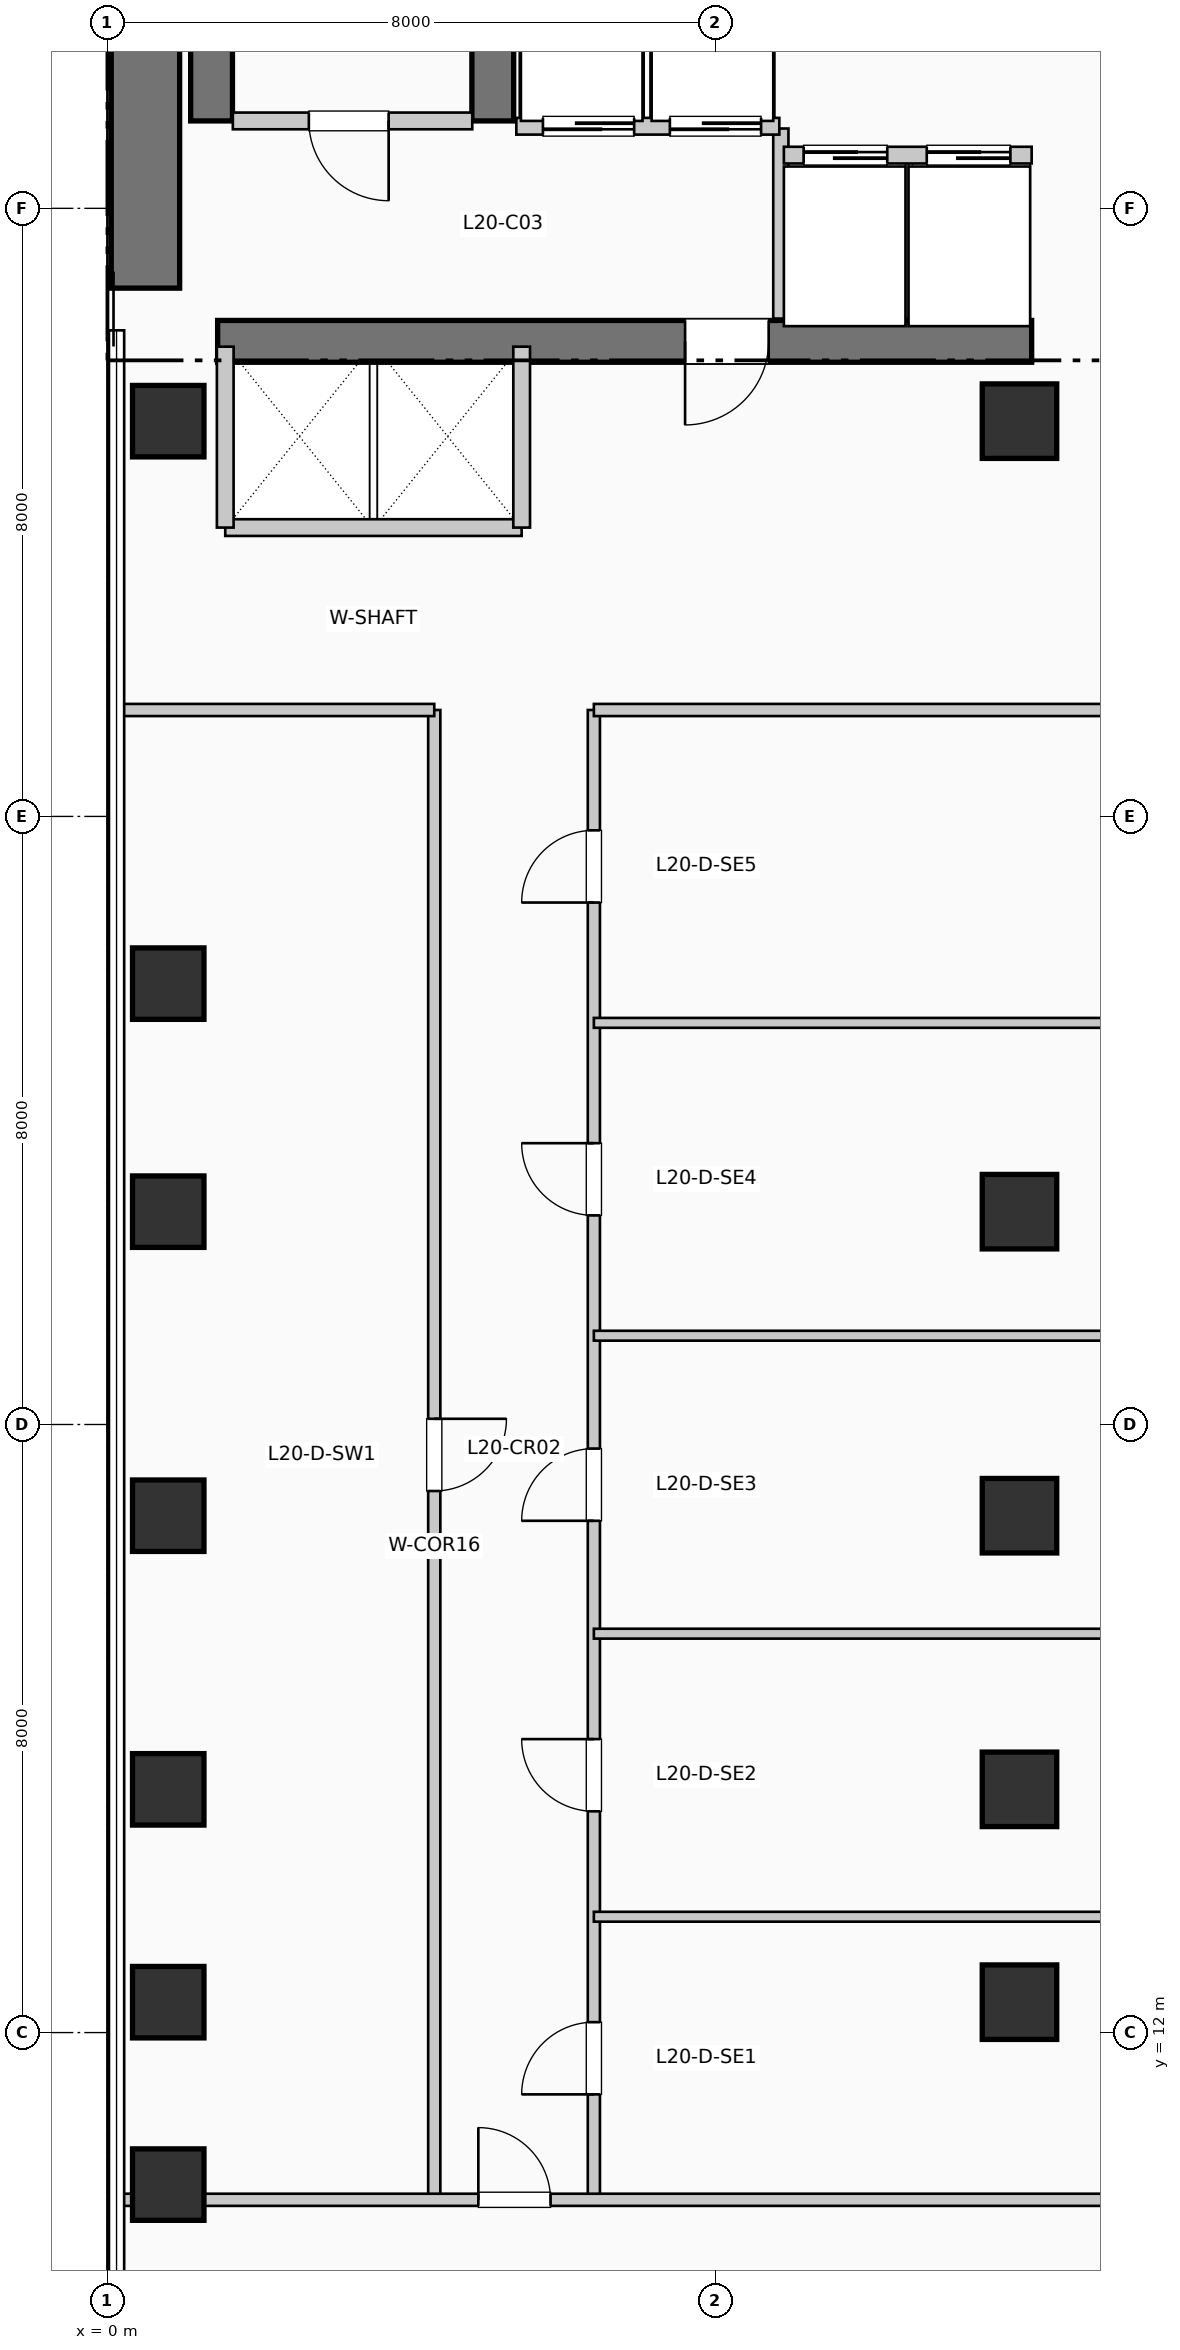
"""IFC4 building model, lengths in metres.
Left out: names, types, materials, properties, quantities, classifications, styles, units other than length and angle.
Written with IfcOpenShell. Run it as: python <this file> out.ifc"""

import sys

from ifc_helpers import new_model, si_unit, direction, frame, frame_2d, origin, origin_2d, place, context, subcontext, project, spatial, rectangle, extrude, element, fill, save


model = new_model("IFC4")
c1 = context("Model", 3, precision=1e-05, world=origin(), true_north=direction((0.0, 1.0)))
c2 = subcontext(c1, "Body", "Model", "MODEL_VIEW")
j1 = project(units=[si_unit("LENGTHUNIT", "METRE"), si_unit("PLANEANGLEUNIT", "RADIAN")], contexts=[c1])
p1 = place(None, origin())
s1 = spatial("IfcSite", under=j1, at=p1, CompositionType="ELEMENT")
p2 = place(p1, origin())
s2 = spatial("IfcBuilding", under=s1, at=p2, CompositionType="ELEMENT")
p3 = place(p2, frame((0.0, 0.0, 85.8)))
s3 = spatial("IfcBuildingStorey", under=s2, at=p3, CompositionType="ELEMENT", Elevation=85.8)
p4 = place(p3, frame((0.5, 34.95, 0.0), z_axis=(0.0, 0.0, 1.0), x_axis=(0.0, 1.0, 0.0)))
e1 = element("IfcWall", 1, at=p4, inside=s3, PredefinedType="SHEAR", context=c2, shape_type="SweptSolid", body=[
    extrude(rectangle(XDim=7.9, YDim=0.9, at=frame_2d((3.95, 0.0))), origin(), (0.0, 0.0, 1.0), 3.96),
])
p5 = place(p3, frame((1.45, 34.25, 0.0), z_axis=(0.0, 0.0, 1.0), x_axis=(1.0, 0.0, 0.0)))
e2 = element("IfcWall", 2, at=p5, inside=s3, PredefinedType="SHEAR", context=c2, shape_type="SweptSolid", body=[
    extrude(rectangle(XDim=10.71, YDim=0.55, at=frame_2d((5.355, 0.0))), origin(), (0.0, 0.0, 1.0), 3.96),
])
p6 = place(p5, frame((7.25, 0.0, 0.0), z_axis=(0.0, 0.0, 1.0), x_axis=(-1.0, 0.0, 0.0)))
e3 = element("IfcOpeningElement", 3, at=p6, cuts=e2, PredefinedType="OPENING", context=c2, shape_type="SweptSolid", body=[
    extrude(rectangle(XDim=1.1, YDim=2.15, at=frame_2d((0.55, 1.075))), frame((0.0, 0.285, 0.0), z_axis=(0.0, -1.0, 0.0), x_axis=(1.0, 0.0, 0.0)), (0.0, 0.0, 1.0), 0.57),
])
for number, where, z_axis, x_axis in (
    (4, (1.37, 37.15, 0.0), (0.0, 0.0, 1.0), (0.0, 1.0, 0.0)),
    (5, (5.07, 37.15, 0.0), (0.0, 0.0, 1.0), (0.0, 1.0, 0.0)),
):
    element("IfcWall", number, at=place(p3, frame(where, z_axis=z_axis, x_axis=x_axis)), inside=s3, PredefinedType="SHEAR", context=c2, shape_type="SweptSolid", body=[
        extrude(rectangle(XDim=7.89, YDim=0.55, at=frame_2d((3.945, 0.0))), origin(), (0.0, 0.0, 1.0), 3.96),
    ])
for number, where, z_axis, x_axis in (
    (6, (0.8, 10.0, 0.0), (0.0, 0.0, 1.0), (1.0, 0.0, 0.0)),
    (7, (0.8, 12.4, 0.0), (0.0, 0.0, 1.0), (1.0, 0.0, 0.0)),
    (8, (0.8, 15.2, 0.0), (0.0, 0.0, 1.0), (1.0, 0.0, 0.0)),
    (9, (0.8, 18.8, 0.0), (0.0, 0.0, 1.0), (1.0, 0.0, 0.0)),
    (10, (0.8, 22.8, 0.0), (0.0, 0.0, 1.0), (1.0, 0.0, 0.0)),
    (11, (0.8, 25.8, 0.0), (0.0, 0.0, 1.0), (1.0, 0.0, 0.0)),
    (12, (0.8, 33.2, 0.0), (0.0, 0.0, 1.0), (1.0, 0.0, 0.0)),
):
    element("IfcColumn", number, at=place(p3, frame(where, z_axis=z_axis, x_axis=x_axis)), inside=s3, PredefinedType="COLUMN", context=c2, shape_type="SweptSolid", body=[
        extrude(rectangle(XDim=0.94, YDim=0.94, at=origin_2d()), origin(), (0.0, 0.0, 1.0), 3.96),
    ])
for number, where, z_axis, x_axis in (
    (13, (12.0, 12.4, 0.0), (0.0, 0.0, 1.0), (1.0, 0.0, 0.0)),
    (14, (12.0, 15.2, 0.0), (0.0, 0.0, 1.0), (1.0, 0.0, 0.0)),
    (15, (12.0, 18.8, 0.0), (0.0, 0.0, 1.0), (1.0, 0.0, 0.0)),
    (16, (12.0, 22.8, 0.0), (0.0, 0.0, 1.0), (1.0, 0.0, 0.0)),
    (17, (12.0, 33.2, 0.0), (0.0, 0.0, 1.0), (1.0, 0.0, 0.0)),
):
    element("IfcColumn", number, at=place(p3, frame(where, z_axis=z_axis, x_axis=x_axis)), inside=s3, PredefinedType="COLUMN", context=c2, shape_type="SweptSolid", body=[
        extrude(rectangle(XDim=0.98, YDim=0.98, at=origin_2d()), origin(), (0.0, 0.0, 1.0), 3.96),
    ])
p7 = place(p3, frame((1.65, 37.15, 0.0), z_axis=(0.0, 0.0, 1.0), x_axis=(1.0, 0.0, 0.0)))
e18 = element("IfcWall", 18, at=p7, inside=s3, PredefinedType="PARTITIONING", context=c2, shape_type="SweptSolid", body=[
    extrude(rectangle(XDim=3.15, YDim=0.22, at=frame_2d((1.575, 0.0))), origin(), (0.0, 0.0, 1.0), 3.71),
])
p8 = place(p7, frame((2.05, 0.0, 0.0), z_axis=(0.0, 0.0, 1.0), x_axis=(-1.0, 0.0, 0.0)))
e19 = element("IfcOpeningElement", 19, at=p8, cuts=e18, PredefinedType="OPENING", context=c2, shape_type="SweptSolid", body=[
    extrude(rectangle(XDim=1.05, YDim=2.15, at=frame_2d((0.525, 1.075))), frame((0.0, 0.12, 0.0), z_axis=(0.0, -1.0, 0.0), x_axis=(1.0, 0.0, 0.0)), (0.0, 0.0, 1.0), 0.24),
])
p9 = place(p3, frame((8.86, 34.55, 0.0), z_axis=(0.0, 0.0, 1.0), x_axis=(0.0, 1.0, 0.0)))
e20 = element("IfcWall", 20, at=p9, inside=s3, PredefinedType="PARTITIONING", context=c2, shape_type="SweptSolid", body=[
    extrude(rectangle(XDim=2.5, YDim=0.2, at=frame_2d((1.25, 0.0))), origin(), (0.0, 0.0, 1.0), 3.71),
])
p10 = place(p3, frame((5.38, 37.08, 0.0), z_axis=(0.0, 0.0, 1.0), x_axis=(1.0, 0.0, 0.0)))
e21 = element("IfcWall", 21, at=p10, inside=s3, PredefinedType="PARTITIONING", context=c2, shape_type="SweptSolid", body=[
    extrude(rectangle(XDim=3.46, YDim=0.22, at=frame_2d((1.73, 0.0))), origin(), (0.0, 0.0, 1.0), 3.71),
])
p11 = place(p10, frame((1.55, 0.0, 0.0), z_axis=(0.0, 0.0, 1.0), x_axis=(-1.0, 0.0, 0.0)))
e22 = element("IfcOpeningElement", 22, at=p11, cuts=e21, PredefinedType="OPENING", context=c2, shape_type="SweptSolid", body=[
    extrude(rectangle(XDim=1.2, YDim=2.2, at=frame_2d((0.6, 1.1))), frame((0.0, 0.12, 0.0), z_axis=(0.0, -1.0, 0.0), x_axis=(1.0, 0.0, 0.0)), (0.0, 0.0, 1.0), 0.24),
])
p12 = place(p10, frame((3.22, 0.0, 0.0), z_axis=(0.0, 0.0, 1.0), x_axis=(-1.0, 0.0, 0.0)))
e23 = element("IfcOpeningElement", 23, at=p12, cuts=e21, PredefinedType="OPENING", context=c2, shape_type="SweptSolid", body=[
    extrude(rectangle(XDim=1.2, YDim=2.2, at=frame_2d((0.6, 1.1))), frame((0.0, 0.12, 0.0), z_axis=(0.0, -1.0, 0.0), x_axis=(1.0, 0.0, 0.0)), (0.0, 0.0, 1.0), 0.24),
])
p13 = place(p3, frame((1.55, 31.8, 0.0), z_axis=(0.0, 0.0, 1.0), x_axis=(1.0, 0.0, 0.0)))
e24 = element("IfcWall", 24, at=p13, inside=s3, PredefinedType="PARTITIONING", context=c2, shape_type="SweptSolid", body=[
    extrude(rectangle(XDim=3.9, YDim=0.22, at=frame_2d((1.95, 0.0))), origin(), (0.0, 0.0, 1.0), 3.71),
])
for number, where, z_axis, x_axis in (
    (25, (1.55, 31.8, 0.0), (0.0, 0.0, 1.0), (0.0, 1.0, 0.0)),
    (26, (5.45, 31.8, 0.0), (0.0, 0.0, 1.0), (0.0, 1.0, 0.0)),
):
    element("IfcWall", number, at=place(p3, frame(where, z_axis=z_axis, x_axis=x_axis)), inside=s3, PredefinedType="PARTITIONING", context=c2, shape_type="SweptSolid", body=[
        extrude(rectangle(XDim=2.38, YDim=0.22, at=frame_2d((1.19, 0.0))), origin(), (0.0, 0.0, 1.0), 3.71),
    ])
p14 = place(p3, frame((8.9, 36.7, 0.0), z_axis=(0.0, 0.0, 1.0), x_axis=(1.0, 0.0, 0.0)))
e27 = element("IfcWall", 27, at=p14, inside=s3, PredefinedType="PARTITIONING", context=c2, shape_type="SweptSolid", body=[
    extrude(rectangle(XDim=3.26, YDim=0.22, at=frame_2d((1.63, 0.0))), origin(), (0.0, 0.0, 1.0), 3.71),
])
p15 = place(p14, frame((0.26, 0.0, 0.0)))
e28 = element("IfcOpeningElement", 28, at=p15, cuts=e27, PredefinedType="OPENING", context=c2, shape_type="SweptSolid", body=[
    extrude(rectangle(XDim=1.1, YDim=2.2, at=frame_2d((0.55, 1.1))), frame((0.0, 0.12, 0.0), z_axis=(0.0, -1.0, 0.0), x_axis=(1.0, 0.0, 0.0)), (0.0, 0.0, 1.0), 0.24),
])
p16 = place(p14, frame((1.88, 0.0, 0.0)))
e29 = element("IfcOpeningElement", 29, at=p16, cuts=e27, PredefinedType="OPENING", context=c2, shape_type="SweptSolid", body=[
    extrude(rectangle(XDim=1.1, YDim=2.2, at=frame_2d((0.55, 1.1))), frame((0.0, 0.12, 0.0), z_axis=(0.0, -1.0, 0.0), x_axis=(1.0, 0.0, 0.0)), (0.0, 0.0, 1.0), 0.24),
])
p17 = place(p3, frame((4.3, 9.8, 0.0), z_axis=(0.0, 0.0, 1.0), x_axis=(0.0, 1.0, 0.0)))
e30 = element("IfcWall", 30, at=p17, inside=s3, PredefinedType="PARTITIONING", context=c2, shape_type="SweptSolid", body=[
    extrude(rectangle(XDim=19.6, YDim=0.16, at=frame_2d((9.8, 0.0))), origin(), (0.0, 0.0, 1.0), 3.71),
])
p18 = place(p17, frame((10.275, 0.0, 0.0), z_axis=(0.0, 0.0, 1.0), x_axis=(-1.0, 0.0, 0.0)))
e31 = element("IfcOpeningElement", 31, at=p18, cuts=e30, PredefinedType="OPENING", context=c2, shape_type="SweptSolid", body=[
    extrude(rectangle(XDim=0.95, YDim=2.15, at=frame_2d((0.475, 1.075))), frame((0.0, 0.09, 0.0), z_axis=(0.0, -1.0, 0.0), x_axis=(1.0, 0.0, 0.0)), (0.0, 0.0, 1.0), 0.18),
])
p19 = place(p3, frame((6.4, 9.8, 0.0), z_axis=(0.0, 0.0, 1.0), x_axis=(0.0, 1.0, 0.0)))
e32 = element("IfcWall", 32, at=p19, inside=s3, PredefinedType="PARTITIONING", context=c2, shape_type="SweptSolid", body=[
    extrude(rectangle(XDim=19.6, YDim=0.16, at=frame_2d((9.8, 0.0))), origin(), (0.0, 0.0, 1.0), 3.71),
])
p20 = place(p19, frame((1.387, 0.0, 0.0)))
e33 = element("IfcOpeningElement", 33, at=p20, cuts=e32, PredefinedType="OPENING", context=c2, shape_type="SweptSolid", body=[
    extrude(rectangle(XDim=0.95, YDim=2.15, at=frame_2d((0.475, 1.075))), frame((0.0, 0.09, 0.0), z_axis=(0.0, -1.0, 0.0), x_axis=(1.0, 0.0, 0.0)), (0.0, 0.0, 1.0), 0.18),
])
p21 = place(p19, frame((5.111, 0.0, 0.0)))
e34 = element("IfcOpeningElement", 34, at=p21, cuts=e32, PredefinedType="OPENING", context=c2, shape_type="SweptSolid", body=[
    extrude(rectangle(XDim=0.95, YDim=2.15, at=frame_2d((0.475, 1.075))), frame((0.0, 0.09, 0.0), z_axis=(0.0, -1.0, 0.0), x_axis=(1.0, 0.0, 0.0)), (0.0, 0.0, 1.0), 0.18),
])
p22 = place(p19, frame((8.933, 0.0, 0.0)))
e35 = element("IfcOpeningElement", 35, at=p22, cuts=e32, PredefinedType="OPENING", context=c2, shape_type="SweptSolid", body=[
    extrude(rectangle(XDim=0.95, YDim=2.15, at=frame_2d((0.475, 1.075))), frame((0.0, 0.09, 0.0), z_axis=(0.0, -1.0, 0.0), x_axis=(1.0, 0.0, 0.0)), (0.0, 0.0, 1.0), 0.18),
])
p23 = place(p19, frame((12.951, 0.0, 0.0)))
e36 = element("IfcOpeningElement", 36, at=p23, cuts=e32, PredefinedType="OPENING", context=c2, shape_type="SweptSolid", body=[
    extrude(rectangle(XDim=0.95, YDim=2.15, at=frame_2d((0.475, 1.075))), frame((0.0, 0.09, 0.0), z_axis=(0.0, -1.0, 0.0), x_axis=(1.0, 0.0, 0.0)), (0.0, 0.0, 1.0), 0.18),
])
p24 = place(p19, frame((17.067, 0.0, 0.0)))
e37 = element("IfcOpeningElement", 37, at=p24, cuts=e32, PredefinedType="OPENING", context=c2, shape_type="SweptSolid", body=[
    extrude(rectangle(XDim=0.95, YDim=2.15, at=frame_2d((0.475, 1.075))), frame((0.0, 0.09, 0.0), z_axis=(0.0, -1.0, 0.0), x_axis=(1.0, 0.0, 0.0)), (0.0, 0.0, 1.0), 0.18),
])
p25 = place(p3, frame((0.19, 9.8, 0.0), z_axis=(0.0, 0.0, 1.0), x_axis=(1.0, 0.0, 0.0)))
e38 = element("IfcWall", 38, at=p25, inside=s3, PredefinedType="PARTITIONING", context=c2, shape_type="SweptSolid", body=[
    extrude(rectangle(XDim=23.26, YDim=0.16, at=frame_2d((11.63, 0.0))), origin(), (0.0, 0.0, 1.0), 2.995),
])
p26 = place(p25, frame((4.69, 0.0, 0.0)))
e39 = element("IfcOpeningElement", 39, at=p26, cuts=e38, PredefinedType="OPENING", context=c2, shape_type="SweptSolid", body=[
    extrude(rectangle(XDim=0.95, YDim=2.15, at=frame_2d((0.475, 1.075))), frame((0.0, 0.09, 0.0), z_axis=(0.0, -1.0, 0.0), x_axis=(1.0, 0.0, 0.0)), (0.0, 0.0, 1.0), 0.18),
])
p27 = place(p3, frame((0.19, 29.4, 0.0), z_axis=(0.0, 0.0, 1.0), x_axis=(1.0, 0.0, 0.0)))
e40 = element("IfcWall", 40, at=p27, inside=s3, PredefinedType="PARTITIONING", context=c2, shape_type="SweptSolid", body=[
    extrude(rectangle(XDim=4.11, YDim=0.16, at=frame_2d((2.055, 0.0))), origin(), (0.0, 0.0, 1.0), 3.365),
])
p28 = place(p3, frame((6.4, 29.4, 0.0), z_axis=(0.0, 0.0, 1.0), x_axis=(1.0, 0.0, 0.0)))
e41 = element("IfcWall", 41, at=p28, inside=s3, PredefinedType="PARTITIONING", context=c2, shape_type="SweptSolid", body=[
    extrude(rectangle(XDim=17.05, YDim=0.16, at=frame_2d((8.525, 0.0))), origin(), (0.0, 0.0, 1.0), 3.365),
])
for number, where, z_axis, x_axis in (
    (42, (6.4, 13.524, 0.0), (0.0, 0.0, 1.0), (1.0, 0.0, 0.0)),
    (43, (6.4, 17.248, 0.0), (0.0, 0.0, 1.0), (1.0, 0.0, 0.0)),
    (44, (6.4, 21.168, 0.0), (0.0, 0.0, 1.0), (1.0, 0.0, 0.0)),
    (45, (6.4, 25.284, 0.0), (0.0, 0.0, 1.0), (1.0, 0.0, 0.0)),
):
    element("IfcWall", number, at=place(p3, frame(where, z_axis=z_axis, x_axis=x_axis)), inside=s3, PredefinedType="PARTITIONING", context=c2, shape_type="SweptSolid", body=[
        extrude(rectangle(XDim=17.05, YDim=0.13, at=frame_2d((8.525, 0.0))), origin(), (0.0, 0.0, 1.0), 3.71),
    ])
p29 = place(p8, origin())
e46 = element("IfcDoor", 46, at=p29, inside=s3, OperationType="SINGLE_SWING_RIGHT", PredefinedType="DOOR", context=c2, shape_type="SweptSolid", body=[
    extrude(rectangle(XDim=1.05, YDim=2.15, at=frame_2d((0.525, 1.075))), frame((0.0, 0.025, 0.0), z_axis=(0.0, -1.0, 0.0), x_axis=(1.0, 0.0, 0.0)), (0.0, 0.0, 1.0), 0.05),
])
fill(e19, e46)
p30 = place(p6, origin())
e47 = element("IfcDoor", 47, at=p30, inside=s3, OperationType="SINGLE_SWING_LEFT", PredefinedType="DOOR", context=c2, shape_type="SweptSolid", body=[
    extrude(rectangle(XDim=1.1, YDim=2.15, at=frame_2d((0.55, 1.075))), frame((0.0, 0.025, 0.0), z_axis=(0.0, -1.0, 0.0), x_axis=(1.0, 0.0, 0.0)), (0.0, 0.0, 1.0), 0.05),
])
fill(e3, e47)
p31 = place(p11, origin())
e48 = element("IfcDoor", 48, at=p31, inside=s3, OperationType="SLIDING_TO_RIGHT", PredefinedType="DOOR", context=c2, shape_type="SweptSolid", body=[
    extrude(rectangle(XDim=1.2, YDim=2.2, at=frame_2d((0.6, 1.1))), frame((0.0, 0.025, 0.0), z_axis=(0.0, -1.0, 0.0), x_axis=(1.0, 0.0, 0.0)), (0.0, 0.0, 1.0), 0.05),
])
fill(e22, e48)
p32 = place(p12, origin())
e49 = element("IfcDoor", 49, at=p32, inside=s3, OperationType="SLIDING_TO_RIGHT", PredefinedType="DOOR", context=c2, shape_type="SweptSolid", body=[
    extrude(rectangle(XDim=1.2, YDim=2.2, at=frame_2d((0.6, 1.1))), frame((0.0, 0.025, 0.0), z_axis=(0.0, -1.0, 0.0), x_axis=(1.0, 0.0, 0.0)), (0.0, 0.0, 1.0), 0.05),
])
fill(e23, e49)
p33 = place(p15, origin())
e50 = element("IfcDoor", 50, at=p33, inside=s3, OperationType="SLIDING_TO_LEFT", PredefinedType="DOOR", context=c2, shape_type="SweptSolid", body=[
    extrude(rectangle(XDim=1.1, YDim=2.2, at=frame_2d((0.55, 1.1))), frame((0.0, 0.025, 0.0), z_axis=(0.0, -1.0, 0.0), x_axis=(1.0, 0.0, 0.0)), (0.0, 0.0, 1.0), 0.05),
])
fill(e28, e50)
p34 = place(p16, origin())
e51 = element("IfcDoor", 51, at=p34, inside=s3, OperationType="SLIDING_TO_LEFT", PredefinedType="DOOR", context=c2, shape_type="SweptSolid", body=[
    extrude(rectangle(XDim=1.1, YDim=2.2, at=frame_2d((0.55, 1.1))), frame((0.0, 0.025, 0.0), z_axis=(0.0, -1.0, 0.0), x_axis=(1.0, 0.0, 0.0)), (0.0, 0.0, 1.0), 0.05),
])
fill(e29, e51)
p35 = place(p26, origin())
e52 = element("IfcDoor", 52, at=p35, inside=s3, OperationType="SINGLE_SWING_LEFT", PredefinedType="DOOR", context=c2, shape_type="SweptSolid", body=[
    extrude(rectangle(XDim=0.95, YDim=2.15, at=frame_2d((0.475, 1.075))), frame((0.0, 0.025, 0.0), z_axis=(0.0, -1.0, 0.0), x_axis=(1.0, 0.0, 0.0)), (0.0, 0.0, 1.0), 0.05),
])
fill(e39, e52)
p36 = place(p18, origin())
e53 = element("IfcDoor", 53, at=p36, inside=s3, OperationType="SINGLE_SWING_RIGHT", PredefinedType="DOOR", context=c2, shape_type="SweptSolid", body=[
    extrude(rectangle(XDim=0.95, YDim=2.15, at=frame_2d((0.475, 1.075))), frame((0.0, 0.025, 0.0), z_axis=(0.0, -1.0, 0.0), x_axis=(1.0, 0.0, 0.0)), (0.0, 0.0, 1.0), 0.05),
])
fill(e31, e53)
p37 = place(p20, origin())
e54 = element("IfcDoor", 54, at=p37, inside=s3, OperationType="SINGLE_SWING_LEFT", PredefinedType="DOOR", context=c2, shape_type="SweptSolid", body=[
    extrude(rectangle(XDim=0.95, YDim=2.15, at=frame_2d((0.475, 1.075))), frame((0.0, 0.025, 0.0), z_axis=(0.0, -1.0, 0.0), x_axis=(1.0, 0.0, 0.0)), (0.0, 0.0, 1.0), 0.05),
])
fill(e33, e54)
p38 = place(p21, origin())
e55 = element("IfcDoor", 55, at=p38, inside=s3, OperationType="SINGLE_SWING_RIGHT", PredefinedType="DOOR", context=c2, shape_type="SweptSolid", body=[
    extrude(rectangle(XDim=0.95, YDim=2.15, at=frame_2d((0.475, 1.075))), frame((0.0, 0.025, 0.0), z_axis=(0.0, -1.0, 0.0), x_axis=(1.0, 0.0, 0.0)), (0.0, 0.0, 1.0), 0.05),
])
fill(e34, e55)
p39 = place(p22, origin())
e56 = element("IfcDoor", 56, at=p39, inside=s3, OperationType="SINGLE_SWING_LEFT", PredefinedType="DOOR", context=c2, shape_type="SweptSolid", body=[
    extrude(rectangle(XDim=0.95, YDim=2.15, at=frame_2d((0.475, 1.075))), frame((0.0, 0.025, 0.0), z_axis=(0.0, -1.0, 0.0), x_axis=(1.0, 0.0, 0.0)), (0.0, 0.0, 1.0), 0.05),
])
fill(e35, e56)
p40 = place(p23, origin())
e57 = element("IfcDoor", 57, at=p40, inside=s3, OperationType="SINGLE_SWING_RIGHT", PredefinedType="DOOR", context=c2, shape_type="SweptSolid", body=[
    extrude(rectangle(XDim=0.95, YDim=2.15, at=frame_2d((0.475, 1.075))), frame((0.0, 0.025, 0.0), z_axis=(0.0, -1.0, 0.0), x_axis=(1.0, 0.0, 0.0)), (0.0, 0.0, 1.0), 0.05),
])
fill(e36, e57)
p41 = place(p24, origin())
e58 = element("IfcDoor", 58, at=p41, inside=s3, OperationType="SINGLE_SWING_LEFT", PredefinedType="DOOR", context=c2, shape_type="SweptSolid", body=[
    extrude(rectangle(XDim=0.95, YDim=2.15, at=frame_2d((0.475, 1.075))), frame((0.0, 0.025, 0.0), z_axis=(0.0, -1.0, 0.0), x_axis=(1.0, 0.0, 0.0)), (0.0, 0.0, 1.0), 0.05),
])
fill(e37, e58)
save(model, sys.argv[1])
